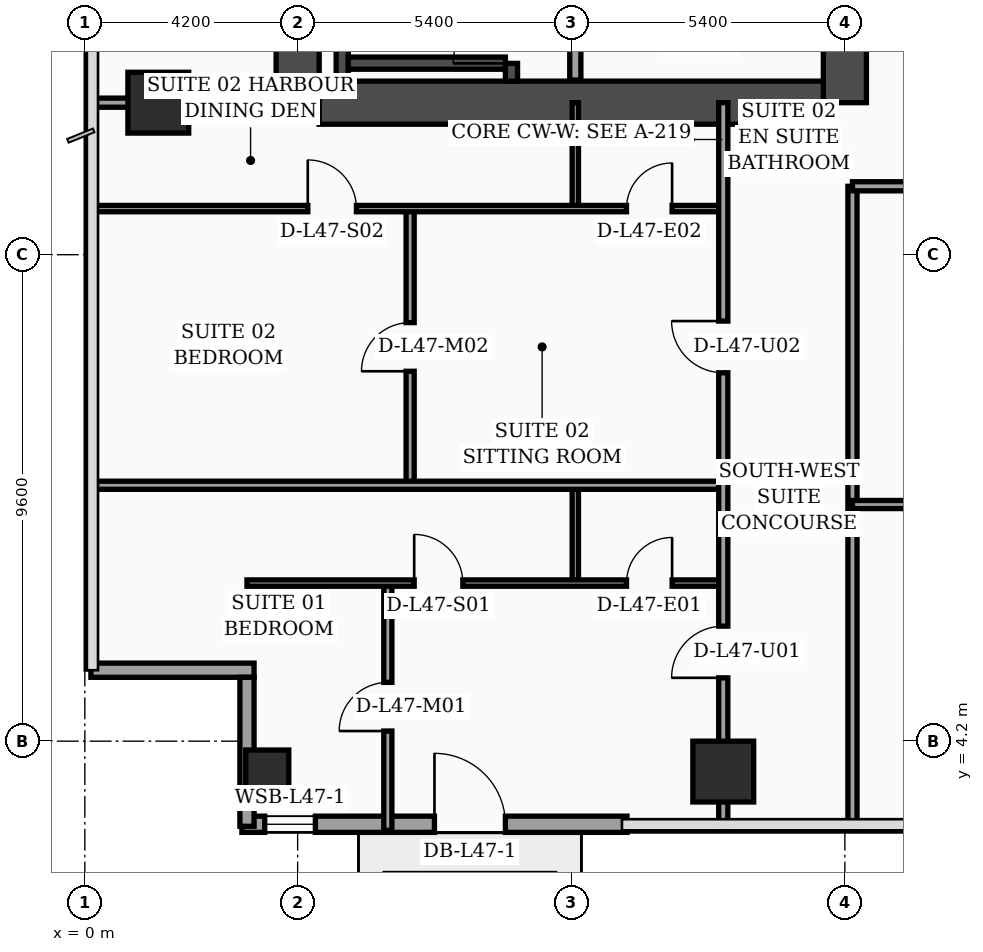
"""IFC4 building model, lengths in metres.
Left out: names, types, materials, properties, quantities, classifications, styles, units other than length and angle.
Written with IfcOpenShell. Run it as: python <this file> out.ifc"""

import sys

from ifc_helpers import new_model, si_unit, direction, frame, frame_2d, origin, origin_2d, place, context, subcontext, project, spatial, rectangle, hollow_rectangle, extrude, element, fill, save


model = new_model("IFC4")
c1 = context("Model", 3, precision=1e-05, world=origin(), true_north=direction((0.0, 1.0)))
c2 = subcontext(c1, "Body", "Model", "MODEL_VIEW")
j1 = project(units=[si_unit("LENGTHUNIT", "METRE"), si_unit("PLANEANGLEUNIT", "RADIAN")], contexts=[c1])
p1 = place(None, origin())
s1 = spatial("IfcSite", under=j1, at=p1, CompositionType="ELEMENT")
p2 = place(p1, origin())
s2 = spatial("IfcBuilding", under=s1, at=p2, CompositionType="ELEMENT")
p3 = place(p2, frame((0.0, 0.0, 191.3)))
s3 = spatial("IfcBuildingStorey", under=s2, at=p3, CompositionType="ELEMENT", Elevation=191.3)
p4 = place(p3, frame((4.2, 16.8, 0.0), z_axis=(0.0, 0.0, 1.0), x_axis=(0.0, 1.0, 0.0)))
e1 = element("IfcWall", 1, at=p4, inside=s3, PredefinedType="SHEAR", context=c2, shape_type="SweptSolid", body=[
    extrude(rectangle(XDim=21.6, YDim=0.85, at=frame_2d((10.8, 0.0))), origin(), (0.0, 0.0, 1.0), 3.56),
])
p5 = place(p3, frame((15.0, 16.8, 0.0), z_axis=(0.0, 0.0, 1.0), x_axis=(0.0, 1.0, 0.0)))
e2 = element("IfcWall", 2, at=p5, inside=s3, PredefinedType="SHEAR", context=c2, shape_type="SweptSolid", body=[
    extrude(rectangle(XDim=21.6, YDim=0.85, at=frame_2d((10.8, 0.0))), origin(), (0.0, 0.0, 1.0), 3.56),
])
p6 = place(p5, frame((8.65, 0.0, 0.0)))
e3 = element("IfcOpeningElement", 3, at=p6, cuts=e2, PredefinedType="OPENING", context=c2, shape_type="SweptSolid", body=[
    extrude(rectangle(XDim=1.1, YDim=2.2, at=frame_2d((0.55, 1.1))), frame((0.0, 0.435, 0.0), z_axis=(0.0, -1.0, 0.0), x_axis=(1.0, 0.0, 0.0)), (0.0, 0.0, 1.0), 0.87),
])
p7 = place(p5, frame((10.85, 0.0, 0.0)))
e4 = element("IfcOpeningElement", 4, at=p7, cuts=e2, PredefinedType="OPENING", context=c2, shape_type="SweptSolid", body=[
    extrude(rectangle(XDim=1.1, YDim=2.2, at=frame_2d((0.55, 1.1))), frame((0.0, 0.435, 0.0), z_axis=(0.0, -1.0, 0.0), x_axis=(1.0, 0.0, 0.0)), (0.0, 0.0, 1.0), 0.87),
])
p8 = place(p5, frame((13.5, 0.0, 0.0)))
e5 = element("IfcOpeningElement", 5, at=p8, cuts=e2, PredefinedType="OPENING", context=c2, shape_type="SweptSolid", body=[
    extrude(rectangle(XDim=1.1, YDim=2.2, at=frame_2d((0.55, 1.1))), frame((0.0, 0.435, 0.0), z_axis=(0.0, -1.0, 0.0), x_axis=(1.0, 0.0, 0.0)), (0.0, 0.0, 1.0), 0.87),
])
p9 = place(p5, frame((16.15, 0.0, 0.0)))
e6 = element("IfcOpeningElement", 6, at=p9, cuts=e2, PredefinedType="OPENING", context=c2, shape_type="SweptSolid", body=[
    extrude(rectangle(XDim=1.1, YDim=2.2, at=frame_2d((0.55, 1.1))), frame((0.0, 0.435, 0.0), z_axis=(0.0, -1.0, 0.0), x_axis=(1.0, 0.0, 0.0)), (0.0, 0.0, 1.0), 0.87),
])
p10 = place(p3, frame((4.625, 16.8, 0.0), z_axis=(0.0, 0.0, 1.0), x_axis=(1.0, 0.0, 0.0)))
e7 = element("IfcWall", 7, at=p10, inside=s3, PredefinedType="SHEAR", context=c2, shape_type="SweptSolid", body=[
    extrude(rectangle(XDim=9.95, YDim=0.85, at=frame_2d((4.975, 0.0))), origin(), (0.0, 0.0, 1.0), 3.56),
])
p11 = place(p3, frame((5.08, 17.225, 0.0), z_axis=(0.0, 0.0, 1.0), x_axis=(0.0, 1.0, 0.0)))
e8 = element("IfcWall", 8, at=p11, inside=s3, PredefinedType="SOLIDWALL", context=c2, shape_type="SweptSolid", body=[
    extrude(rectangle(XDim=9.565, YDim=0.24, at=frame_2d((4.782, 0.0))), origin(), (0.0, 0.0, 1.0), 3.56),
])
p12 = place(p3, frame((8.42, 17.225, 0.0), z_axis=(0.0, 0.0, 1.0), x_axis=(0.0, 1.0, 0.0)))
e9 = element("IfcWall", 9, at=p12, inside=s3, PredefinedType="SOLIDWALL", context=c2, shape_type="SweptSolid", body=[
    extrude(rectangle(XDim=9.565, YDim=0.24, at=frame_2d((4.782, 0.0))), origin(), (0.0, 0.0, 1.0), 3.56),
])
p13 = place(p12, frame((0.35, 0.0, 0.0)))
e10 = element("IfcOpeningElement", 10, at=p13, cuts=e9, PredefinedType="OPENING", context=c2, shape_type="SweptSolid", body=[
    extrude(rectangle(XDim=1.15, YDim=2.2, at=frame_2d((0.575, 1.1))), frame((0.0, 0.13, 0.0), z_axis=(0.0, -1.0, 0.0), x_axis=(1.0, 0.0, 0.0)), (0.0, 0.0, 1.0), 0.26),
])
p14 = place(p3, frame((5.2, 17.58, 0.0), z_axis=(0.0, 0.0, 1.0), x_axis=(1.0, 0.0, 0.0)))
e11 = element("IfcWall", 11, at=p14, inside=s3, PredefinedType="SOLIDWALL", context=c2, shape_type="SweptSolid", body=[
    extrude(rectangle(XDim=3.1, YDim=0.24, at=frame_2d((1.55, 0.0))), origin(), (0.0, 0.0, 1.0), 3.56),
])
p15 = place(p3, frame((3.6, 3.6, 0.0), z_axis=(0.0, 0.0, 1.0), x_axis=(1.0, 0.0, 0.0)))
e12 = element("IfcColumn", 12, at=p15, inside=s3, PredefinedType="COLUMN", context=c2, shape_type="SweptSolid", body=[
    extrude(hollow_rectangle(XDim=0.85, YDim=0.85, WallThickness=0.036, at=origin_2d()), origin(), (0.0, 0.0, 1.0), 3.56),
])
for number, where, z_axis, x_axis in (
    (13, (1.45, 16.8, 0.0), (0.0, 0.0, 1.0), (1.0, 0.0, 0.0)),
    (14, (12.6, 3.6, 0.0), (0.0, 0.0, 1.0), (1.0, 0.0, 0.0)),
):
    element("IfcColumn", number, at=place(p3, frame(where, z_axis=z_axis, x_axis=x_axis)), inside=s3, PredefinedType="COLUMN", context=c2, shape_type="SweptSolid", body=[
        extrude(rectangle(XDim=1.2, YDim=1.2, at=origin_2d()), origin(), (0.0, 0.0, 1.0), 3.56),
    ])
p16 = place(p3, frame((3.1, 2.56, 0.0), z_axis=(0.0, 0.0, 1.0), x_axis=(1.0, 0.0, 0.0)))
e15 = element("IfcWall", 15, at=p16, inside=s3, PredefinedType="SOLIDWALL", context=c2, shape_type="SweptSolid", body=[
    extrude(rectangle(XDim=7.6, YDim=0.32, at=frame_2d((3.8, 0.0))), origin(), (0.0, 0.0, 1.0), 3.56),
])
p17 = place(p16, frame((0.45, 0.0, 0.75)))
e16 = element("IfcOpeningElement", 16, at=p17, cuts=e15, PredefinedType="OPENING", context=c2, shape_type="SweptSolid", body=[
    extrude(rectangle(XDim=1.0, YDim=1.6, at=frame_2d((0.5, 0.8))), frame((0.0, 0.17, 0.0), z_axis=(0.0, -1.0, 0.0), x_axis=(1.0, 0.0, 0.0)), (0.0, 0.0, 1.0), 0.34),
])
p18 = place(p16, frame((3.8, 0.0, 0.0)))
e17 = element("IfcOpeningElement", 17, at=p18, cuts=e15, PredefinedType="OPENING", context=c2, shape_type="SweptSolid", body=[
    extrude(rectangle(XDim=1.4, YDim=2.25, at=frame_2d((0.7, 1.125))), frame((0.0, 0.17, 0.0), z_axis=(0.0, -1.0, 0.0), x_axis=(1.0, 0.0, 0.0)), (0.0, 0.0, 1.0), 0.34),
])
p19 = place(p3, frame((0.12, 5.6, 0.0), z_axis=(0.0, 0.0, 1.0), x_axis=(1.0, 0.0, 0.0)))
e18 = element("IfcWall", 18, at=p19, inside=s3, PredefinedType="SOLIDWALL", context=c2, shape_type="SweptSolid", body=[
    extrude(rectangle(XDim=3.22, YDim=0.28, at=frame_2d((1.61, 0.0))), origin(), (0.0, 0.0, 1.0), 2.94),
])
p20 = place(p3, frame((3.2, 5.46, 0.0), z_axis=(0.0, 0.0, 1.0), x_axis=(0.0, -1.0, 0.0)))
e19 = element("IfcWall", 19, at=p20, inside=s3, PredefinedType="SOLIDWALL", context=c2, shape_type="SweptSolid", body=[
    extrude(rectangle(XDim=2.94, YDim=0.28, at=frame_2d((1.47, 0.0))), origin(), (0.0, 0.0, 1.0), 2.94),
])
p21 = place(p3, frame((9.68, 17.245, 0.0), z_axis=(0.0, 0.0, 1.0), x_axis=(0.0, 1.0, 0.0)))
e20 = element("IfcWall", 20, at=p21, inside=s3, PredefinedType="SOLIDWALL", context=c2, shape_type="SweptSolid", body=[
    extrude(rectangle(XDim=7.755, YDim=0.22, at=frame_2d((3.877, 0.0))), origin(), (0.0, 0.0, 1.0), 3.56),
])
p22 = place(p3, frame((0.08, 16.8, 0.0), z_axis=(0.0, 0.0, 1.0), x_axis=(1.0, 0.0, 0.0)))
e21 = element("IfcWall", 21, at=p22, inside=s3, PredefinedType="PARTITIONING", context=c2, shape_type="SweptSolid", body=[
    extrude(rectangle(XDim=3.725, YDim=0.18, at=frame_2d((1.862, 0.0))), origin(), (0.0, 0.0, 1.0), 2.94),
])
p23 = place(p3, frame((9.68, 7.32, 0.0), z_axis=(0.0, 0.0, 1.0), x_axis=(0.0, 1.0, 0.0)))
e22 = element("IfcWall", 22, at=p23, inside=s3, PredefinedType="PARTITIONING", context=c2, shape_type="SweptSolid", body=[
    extrude(rectangle(XDim=1.93, YDim=0.125, at=frame_2d((0.965, 0.0))), origin(), (0.0, 0.0, 1.0), 3.09),
])
p24 = place(p3, frame((5.98, 2.44, 0.0), z_axis=(0.0, 0.0, 1.0), x_axis=(0.0, 1.0, 0.0)))
e23 = element("IfcWall", 23, at=p24, inside=s3, PredefinedType="PARTITIONING", context=c2, shape_type="SweptSolid", body=[
    extrude(rectangle(XDim=4.88, YDim=0.16, at=frame_2d((2.44, 0.0))), origin(), (0.0, 0.0, 1.0), 3.09),
])
p25 = place(p24, frame((1.96, 0.0, 0.0)))
e24 = element("IfcOpeningElement", 24, at=p25, cuts=e23, PredefinedType="OPENING", context=c2, shape_type="SweptSolid", body=[
    extrude(rectangle(XDim=0.96, YDim=2.2, at=frame_2d((0.48, 1.1))), frame((0.0, 0.09, 0.0), z_axis=(0.0, -1.0, 0.0), x_axis=(1.0, 0.0, 0.0)), (0.0, 0.0, 1.0), 0.18),
])
p26 = place(p3, frame((3.2, 7.32, 0.0), z_axis=(0.0, 0.0, 1.0), x_axis=(1.0, 0.0, 0.0)))
e25 = element("IfcWall", 25, at=p26, inside=s3, PredefinedType="PARTITIONING", context=c2, shape_type="SweptSolid", body=[
    extrude(rectangle(XDim=9.4, YDim=0.125, at=frame_2d((4.7, 0.0))), origin(), (0.0, 0.0, 1.0), 2.94),
])
p27 = place(p26, frame((3.3, 0.0, 0.0)))
e26 = element("IfcOpeningElement", 26, at=p27, cuts=e25, PredefinedType="OPENING", context=c2, shape_type="SweptSolid", body=[
    extrude(rectangle(XDim=0.96, YDim=2.2, at=frame_2d((0.48, 1.1))), frame((0.0, 0.073, 0.0), z_axis=(0.0, -1.0, 0.0), x_axis=(1.0, 0.0, 0.0)), (0.0, 0.0, 1.0), 0.145),
])
p28 = place(p26, frame((7.49, 0.0, 0.0)))
e27 = element("IfcOpeningElement", 27, at=p28, cuts=e25, PredefinedType="OPENING", context=c2, shape_type="SweptSolid", body=[
    extrude(rectangle(XDim=0.9, YDim=2.15, at=frame_2d((0.45, 1.075))), frame((0.0, 0.073, 0.0), z_axis=(0.0, -1.0, 0.0), x_axis=(1.0, 0.0, 0.0)), (0.0, 0.0, 1.0), 0.145),
])
p29 = place(p3, frame((9.68, 14.71, 0.0), z_axis=(0.0, 0.0, 1.0), x_axis=(0.0, 1.0, 0.0)))
e28 = element("IfcWall", 28, at=p29, inside=s3, PredefinedType="PARTITIONING", context=c2, shape_type="SweptSolid", body=[
    extrude(rectangle(XDim=2.09, YDim=0.125, at=frame_2d((1.045, 0.0))), origin(), (0.0, 0.0, 1.0), 3.56),
])
p30 = place(p3, frame((6.42, 9.25, 0.0), z_axis=(0.0, 0.0, 1.0), x_axis=(0.0, 1.0, 0.0)))
e29 = element("IfcWall", 29, at=p30, inside=s3, PredefinedType="PARTITIONING", context=c2, shape_type="SweptSolid", body=[
    extrude(rectangle(XDim=5.46, YDim=0.16, at=frame_2d((2.73, 0.0))), origin(), (0.0, 0.0, 1.0), 3.14),
])
p31 = place(p30, frame((2.25, 0.0, 0.0)))
e30 = element("IfcOpeningElement", 30, at=p31, cuts=e29, PredefinedType="OPENING", context=c2, shape_type="SweptSolid", body=[
    extrude(rectangle(XDim=0.96, YDim=2.2, at=frame_2d((0.48, 1.1))), frame((0.0, 0.09, 0.0), z_axis=(0.0, -1.0, 0.0), x_axis=(1.0, 0.0, 0.0)), (0.0, 0.0, 1.0), 0.18),
])
p32 = place(p3, frame((0.08, 14.71, 0.0), z_axis=(0.0, 0.0, 1.0), x_axis=(1.0, 0.0, 0.0)))
e31 = element("IfcWall", 31, at=p32, inside=s3, PredefinedType="PARTITIONING", context=c2, shape_type="SweptSolid", body=[
    extrude(rectangle(XDim=12.52, YDim=0.125, at=frame_2d((6.26, 0.0))), origin(), (0.0, 0.0, 1.0), 2.94),
])
p33 = place(p32, frame((4.32, 0.0, 0.0)))
e32 = element("IfcOpeningElement", 32, at=p33, cuts=e31, PredefinedType="OPENING", context=c2, shape_type="SweptSolid", body=[
    extrude(rectangle(XDim=0.96, YDim=2.2, at=frame_2d((0.48, 1.1))), frame((0.0, 0.073, 0.0), z_axis=(0.0, -1.0, 0.0), x_axis=(1.0, 0.0, 0.0)), (0.0, 0.0, 1.0), 0.145),
])
p34 = place(p32, frame((10.61, 0.0, 0.0)))
e33 = element("IfcOpeningElement", 33, at=p34, cuts=e31, PredefinedType="OPENING", context=c2, shape_type="SweptSolid", body=[
    extrude(rectangle(XDim=0.9, YDim=2.15, at=frame_2d((0.45, 1.075))), frame((0.0, 0.073, 0.0), z_axis=(0.0, -1.0, 0.0), x_axis=(1.0, 0.0, 0.0)), (0.0, 0.0, 1.0), 0.145),
])
p35 = place(p3, frame((0.08, 9.25, 0.0), z_axis=(0.0, 0.0, 1.0), x_axis=(1.0, 0.0, 0.0)))
e34 = element("IfcWall", 34, at=p35, inside=s3, PredefinedType="PARTITIONING", context=c2, shape_type="SweptSolid", body=[
    extrude(rectangle(XDim=12.52, YDim=0.16, at=frame_2d((6.26, 0.0))), origin(), (0.0, 0.0, 1.0), 2.94),
])
p36 = place(p3, frame((12.6, 2.44, 0.0), z_axis=(0.0, 0.0, 1.0), x_axis=(0.0, 1.0, 0.0)))
e35 = element("IfcWall", 35, at=p36, inside=s3, PredefinedType="PARTITIONING", context=c2, shape_type="SweptSolid", body=[
    extrude(rectangle(XDim=14.36, YDim=0.18, at=frame_2d((7.18, 0.0))), origin(), (0.0, 0.0, 1.0), 2.94),
])
p37 = place(p36, frame((3.01, 0.0, 0.0)))
e36 = element("IfcOpeningElement", 36, at=p37, cuts=e35, PredefinedType="OPENING", context=c2, shape_type="SweptSolid", body=[
    extrude(rectangle(XDim=1.02, YDim=2.2, at=frame_2d((0.51, 1.1))), frame((0.0, 0.1, 0.0), z_axis=(0.0, -1.0, 0.0), x_axis=(1.0, 0.0, 0.0)), (0.0, 0.0, 1.0), 0.2),
])
p38 = place(p36, frame((9.03, 0.0, 0.0)))
e37 = element("IfcOpeningElement", 37, at=p38, cuts=e35, PredefinedType="OPENING", context=c2, shape_type="SweptSolid", body=[
    extrude(rectangle(XDim=1.02, YDim=2.2, at=frame_2d((0.51, 1.1))), frame((0.0, 0.1, 0.0), z_axis=(0.0, -1.0, 0.0), x_axis=(1.0, 0.0, 0.0)), (0.0, 0.0, 1.0), 0.2),
])
p39 = place(p3, frame((15.15, 2.44, 0.0), z_axis=(0.0, 0.0, 1.0), x_axis=(0.0, 1.0, 0.0)))
e38 = element("IfcWall", 38, at=p39, inside=s3, PredefinedType="PARTITIONING", context=c2, shape_type="SweptSolid", body=[
    extrude(rectangle(XDim=12.71, YDim=0.18, at=frame_2d((6.355, 0.0))), origin(), (0.0, 0.0, 1.0), 3.09),
])
p40 = place(p3, frame((15.15, 8.87, 0.0), z_axis=(0.0, 0.0, 1.0), x_axis=(1.0, 0.0, 0.0)))
e39 = element("IfcWall", 39, at=p40, inside=s3, PredefinedType="PARTITIONING", context=c2, shape_type="SweptSolid", body=[
    extrude(rectangle(XDim=4.45, YDim=0.16, at=frame_2d((2.225, 0.0))), origin(), (0.0, 0.0, 1.0), 3.56),
])
p41 = place(p40, frame((1.75, 0.0, 0.0)))
e40 = element("IfcOpeningElement", 40, at=p41, cuts=e39, PredefinedType="OPENING", context=c2, shape_type="SweptSolid", body=[
    extrude(rectangle(XDim=0.96, YDim=2.2, at=frame_2d((0.48, 1.1))), frame((0.0, 0.09, 0.0), z_axis=(0.0, -1.0, 0.0), x_axis=(1.0, 0.0, 0.0)), (0.0, 0.0, 1.0), 0.18),
])
p42 = place(p3, frame((15.15, 15.15, 0.0), z_axis=(0.0, 0.0, 1.0), x_axis=(1.0, 0.0, 0.0)))
e41 = element("IfcWall", 41, at=p42, inside=s3, PredefinedType="PARTITIONING", context=c2, shape_type="SweptSolid", body=[
    extrude(rectangle(XDim=6.45, YDim=0.18, at=frame_2d((3.225, 0.0))), origin(), (0.0, 0.0, 1.0), 2.49),
])
p43 = place(p42, frame((1.74, 0.0, 0.0)))
e42 = element("IfcOpeningElement", 42, at=p43, cuts=e41, PredefinedType="OPENING", context=c2, shape_type="SweptSolid", body=[
    extrude(rectangle(XDim=1.02, YDim=2.2, at=frame_2d((0.51, 1.1))), frame((0.0, 0.1, 0.0), z_axis=(0.0, -1.0, 0.0), x_axis=(1.0, 0.0, 0.0)), (0.0, 0.0, 1.0), 0.2),
])
p44 = place(p17, origin())
e43 = element("IfcWindow", 43, at=p44, inside=s3, PartitioningType="SINGLE_PANEL", PredefinedType="WINDOW", context=c2, shape_type="SweptSolid", body=[
    extrude(rectangle(XDim=1.0, YDim=1.6, at=frame_2d((0.5, 0.8))), frame((0.0, 0.03, 0.0), z_axis=(0.0, -1.0, 0.0), x_axis=(1.0, 0.0, 0.0)), (0.0, 0.0, 1.0), 0.06),
])
fill(e16, e43)
p45 = place(p18, origin())
e44 = element("IfcDoor", 44, at=p45, inside=s3, OperationType="SINGLE_SWING_LEFT", PredefinedType="DOOR", context=c2, shape_type="SweptSolid", body=[
    extrude(rectangle(XDim=1.4, YDim=2.25, at=frame_2d((0.7, 1.125))), frame((0.0, 0.025, 0.0), z_axis=(0.0, -1.0, 0.0), x_axis=(1.0, 0.0, 0.0)), (0.0, 0.0, 1.0), 0.05),
])
fill(e17, e44)
p46 = place(p25, origin())
e45 = element("IfcDoor", 45, at=p46, inside=s3, OperationType="SINGLE_SWING_LEFT", PredefinedType="DOOR", context=c2, shape_type="SweptSolid", body=[
    extrude(rectangle(XDim=0.96, YDim=2.2, at=frame_2d((0.48, 1.1))), frame((0.0, 0.025, 0.0), z_axis=(0.0, -1.0, 0.0), x_axis=(1.0, 0.0, 0.0)), (0.0, 0.0, 1.0), 0.05),
])
fill(e24, e45)
p47 = place(p27, origin())
e46 = element("IfcDoor", 46, at=p47, inside=s3, OperationType="SINGLE_SWING_LEFT", PredefinedType="DOOR", context=c2, shape_type="SweptSolid", body=[
    extrude(rectangle(XDim=0.96, YDim=2.2, at=frame_2d((0.48, 1.1))), frame((0.0, 0.025, 0.0), z_axis=(0.0, -1.0, 0.0), x_axis=(1.0, 0.0, 0.0)), (0.0, 0.0, 1.0), 0.05),
])
fill(e26, e46)
p48 = place(p28, origin())
e47 = element("IfcDoor", 47, at=p48, inside=s3, OperationType="SINGLE_SWING_RIGHT", PredefinedType="DOOR", context=c2, shape_type="SweptSolid", body=[
    extrude(rectangle(XDim=0.9, YDim=2.15, at=frame_2d((0.45, 1.075))), frame((0.0, 0.025, 0.0), z_axis=(0.0, -1.0, 0.0), x_axis=(1.0, 0.0, 0.0)), (0.0, 0.0, 1.0), 0.05),
])
fill(e27, e47)
p49 = place(p31, origin())
e48 = element("IfcDoor", 48, at=p49, inside=s3, OperationType="SINGLE_SWING_LEFT", PredefinedType="DOOR", context=c2, shape_type="SweptSolid", body=[
    extrude(rectangle(XDim=0.96, YDim=2.2, at=frame_2d((0.48, 1.1))), frame((0.0, 0.025, 0.0), z_axis=(0.0, -1.0, 0.0), x_axis=(1.0, 0.0, 0.0)), (0.0, 0.0, 1.0), 0.05),
])
fill(e30, e48)
p50 = place(p33, origin())
e49 = element("IfcDoor", 49, at=p50, inside=s3, OperationType="SINGLE_SWING_LEFT", PredefinedType="DOOR", context=c2, shape_type="SweptSolid", body=[
    extrude(rectangle(XDim=0.96, YDim=2.2, at=frame_2d((0.48, 1.1))), frame((0.0, 0.025, 0.0), z_axis=(0.0, -1.0, 0.0), x_axis=(1.0, 0.0, 0.0)), (0.0, 0.0, 1.0), 0.05),
])
fill(e32, e49)
p51 = place(p34, origin())
e50 = element("IfcDoor", 50, at=p51, inside=s3, OperationType="SINGLE_SWING_RIGHT", PredefinedType="DOOR", context=c2, shape_type="SweptSolid", body=[
    extrude(rectangle(XDim=0.9, YDim=2.15, at=frame_2d((0.45, 1.075))), frame((0.0, 0.025, 0.0), z_axis=(0.0, -1.0, 0.0), x_axis=(1.0, 0.0, 0.0)), (0.0, 0.0, 1.0), 0.05),
])
fill(e33, e50)
p52 = place(p37, origin())
e51 = element("IfcDoor", 51, at=p52, inside=s3, OperationType="SINGLE_SWING_LEFT", PredefinedType="DOOR", context=c2, shape_type="SweptSolid", body=[
    extrude(rectangle(XDim=1.02, YDim=2.2, at=frame_2d((0.51, 1.1))), frame((0.0, 0.025, 0.0), z_axis=(0.0, -1.0, 0.0), x_axis=(1.0, 0.0, 0.0)), (0.0, 0.0, 1.0), 0.05),
])
fill(e36, e51)
p53 = place(p38, origin())
e52 = element("IfcDoor", 52, at=p53, inside=s3, OperationType="SINGLE_SWING_RIGHT", PredefinedType="DOOR", context=c2, shape_type="SweptSolid", body=[
    extrude(rectangle(XDim=1.02, YDim=2.2, at=frame_2d((0.51, 1.1))), frame((0.0, 0.025, 0.0), z_axis=(0.0, -1.0, 0.0), x_axis=(1.0, 0.0, 0.0)), (0.0, 0.0, 1.0), 0.05),
])
fill(e37, e52)
p54 = place(p13, origin())
e53 = element("IfcDoor", 53, at=p54, inside=s3, OperationType="SINGLE_SWING_LEFT", PredefinedType="DOOR", context=c2, shape_type="SweptSolid", body=[
    extrude(rectangle(XDim=1.15, YDim=2.2, at=frame_2d((0.575, 1.1))), frame((0.0, 0.025, 0.0), z_axis=(0.0, -1.0, 0.0), x_axis=(1.0, 0.0, 0.0)), (0.0, 0.0, 1.0), 0.05),
])
fill(e10, e53)
save(model, sys.argv[1])
